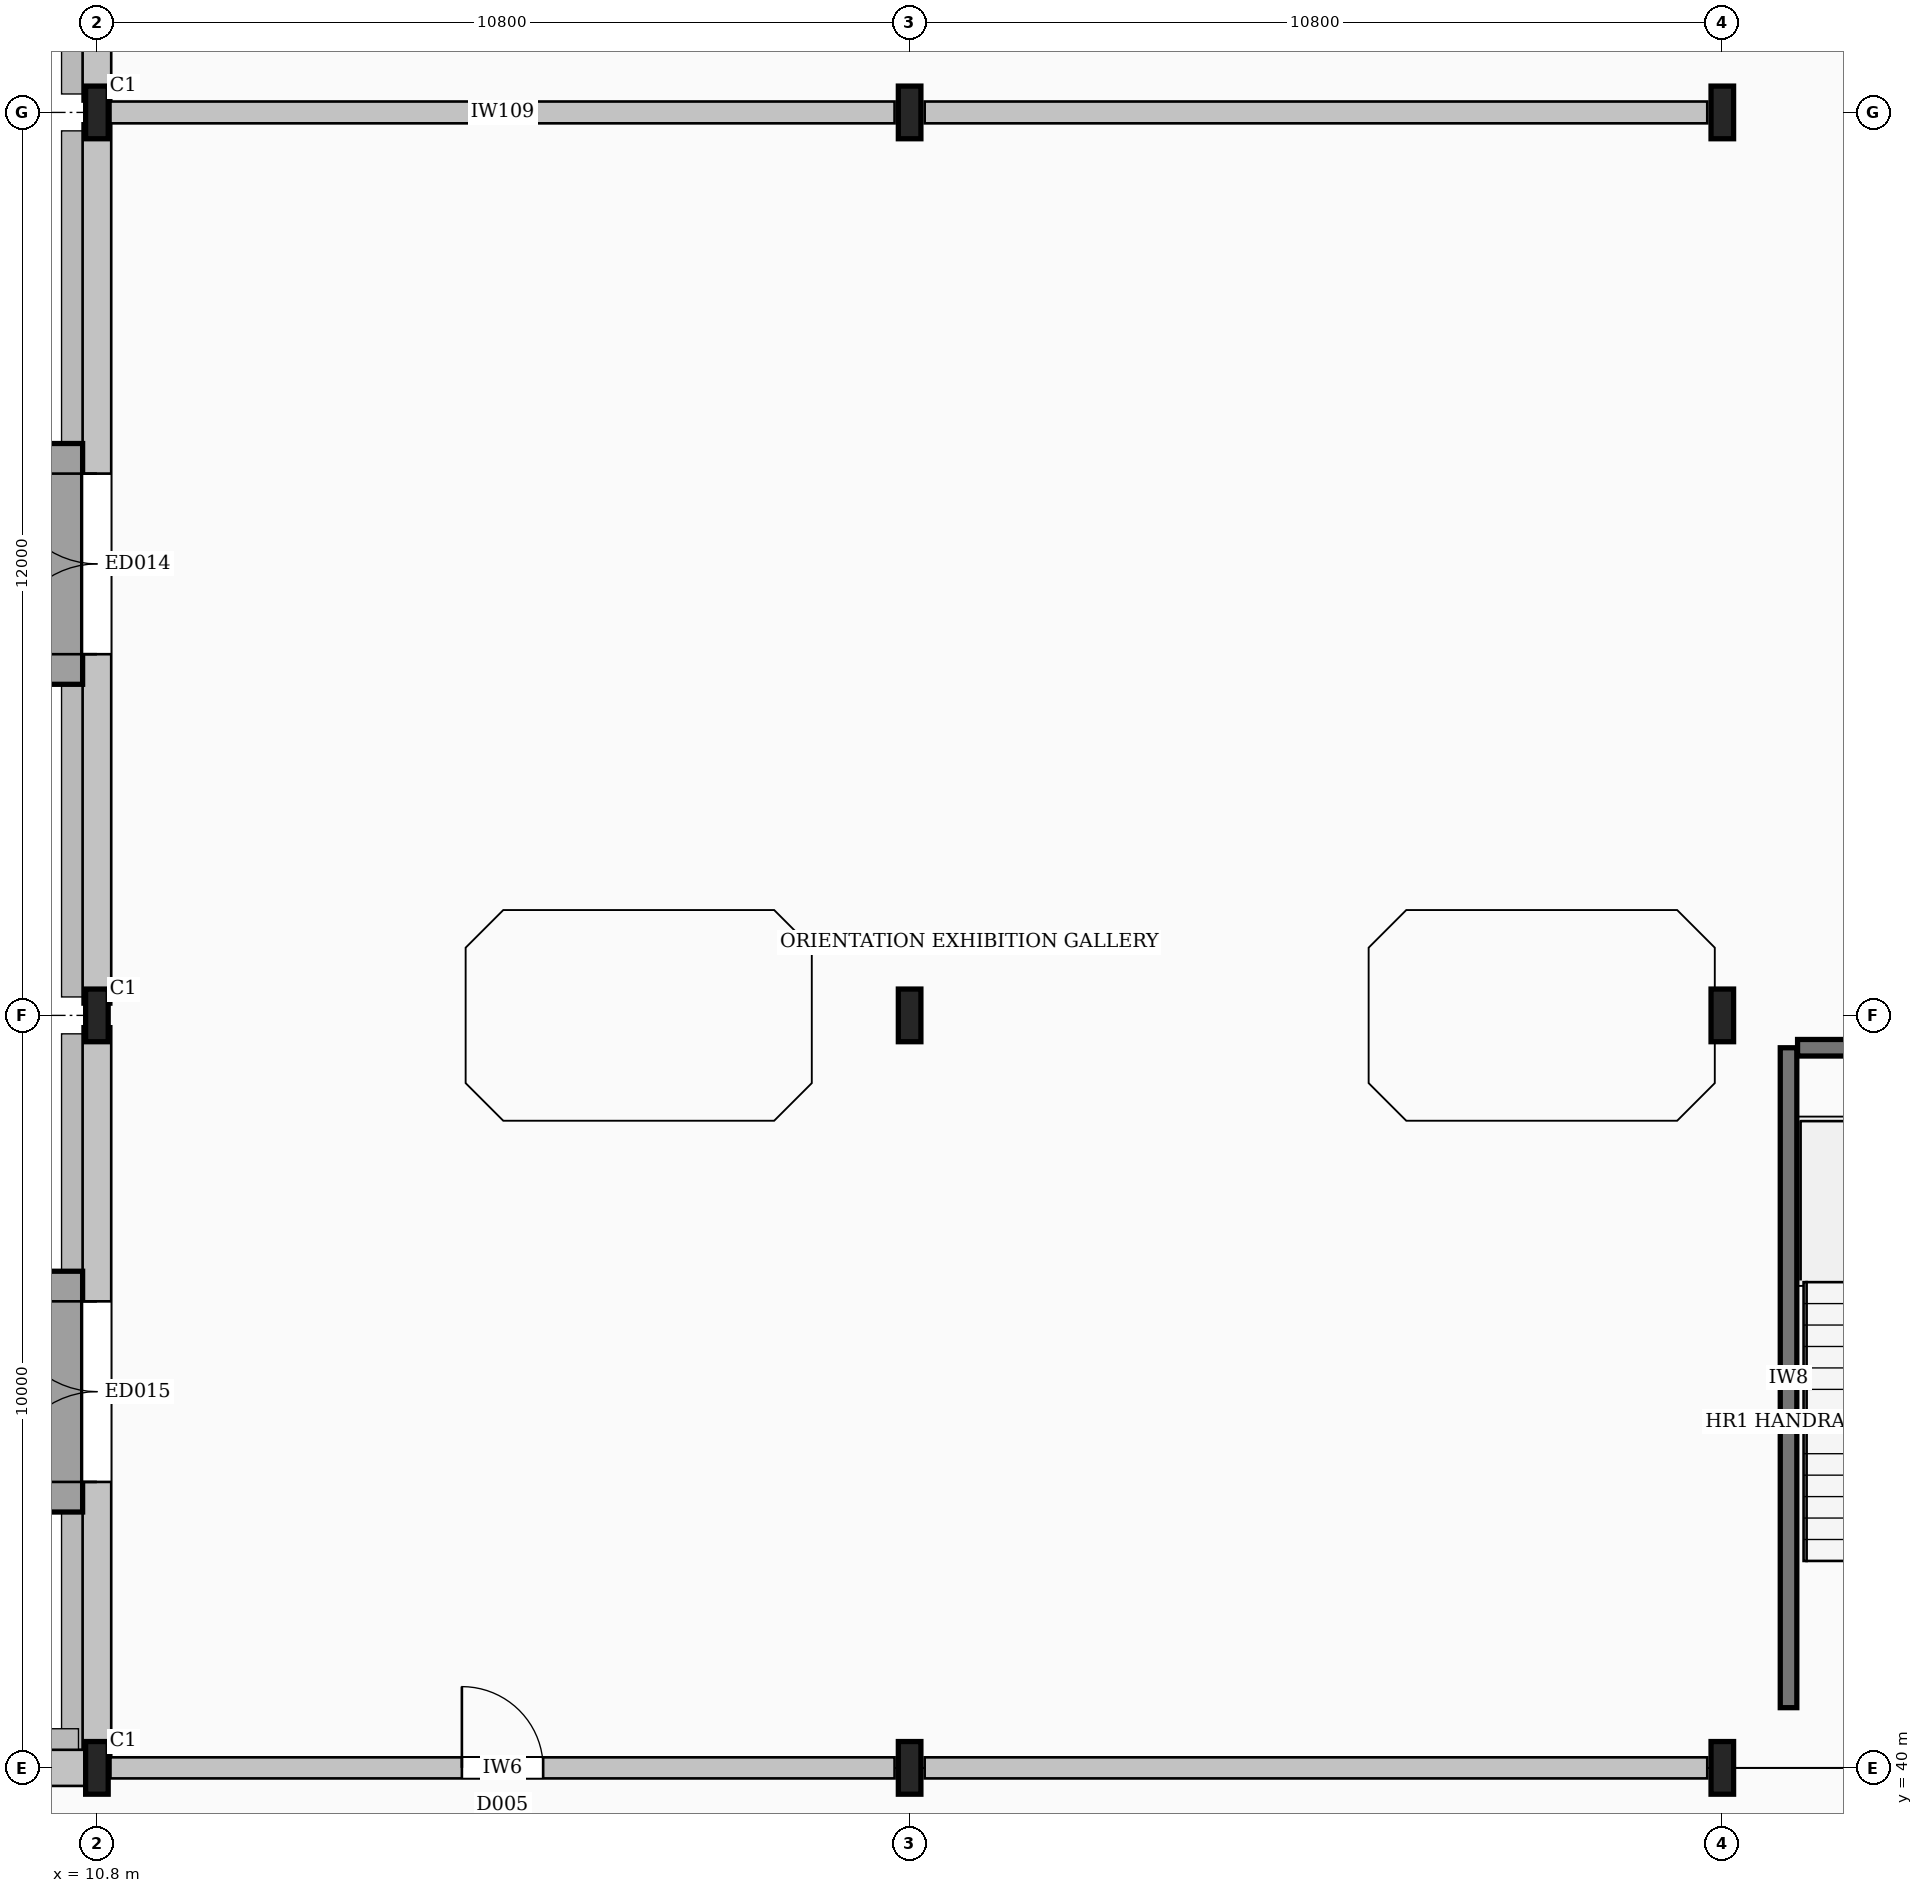
"""IFC4 building model, lengths in metres.
Left out: names, types, materials, properties, quantities, classifications, styles, units other than length and angle.
Written with IfcOpenShell. Run it as: python <this file> out.ifc"""

import sys

from ifc_helpers import new_model, si_unit, direction, frame, frame_2d, origin, origin_2d, place, context, subcontext, project, spatial, rectangle, i_section, extrude, element, fill, save


model = new_model("IFC4")
c1 = context("Model", 3, precision=1e-05, world=origin(), true_north=direction((0.0, 1.0)))
c2 = subcontext(c1, "Body", "Model", "MODEL_VIEW")
j1 = project(units=[si_unit("LENGTHUNIT", "METRE"), si_unit("PLANEANGLEUNIT", "RADIAN")], contexts=[c1])
p1 = place(None, origin())
s1 = spatial("IfcSite", under=j1, at=p1, CompositionType="ELEMENT")
p2 = place(p1, origin())
s2 = spatial("IfcBuilding", under=s1, at=p2, CompositionType="ELEMENT")
p3 = place(p2, origin())
s3 = spatial("IfcBuildingStorey", under=s2, at=p3, CompositionType="ELEMENT", Elevation=0.0)
for number, where, z_axis, x_axis in (
    (1, (10.8, 40.0, 0.0), (0.0, 0.0, 1.0), (1.0, 0.0, 0.0)),
    (2, (10.8, 50.0, 0.0), (0.0, 0.0, 1.0), (1.0, 0.0, 0.0)),
    (3, (10.8, 62.0, 0.0), (0.0, 0.0, 1.0), (1.0, 0.0, 0.0)),
    (4, (21.6, 40.0, 0.0), (0.0, 0.0, 1.0), (1.0, 0.0, 0.0)),
    (5, (21.6, 50.0, 0.0), (0.0, 0.0, 1.0), (1.0, 0.0, 0.0)),
    (6, (21.6, 62.0, 0.0), (0.0, 0.0, 1.0), (1.0, 0.0, 0.0)),
    (7, (32.4, 40.0, 0.0), (0.0, 0.0, 1.0), (1.0, 0.0, 0.0)),
    (8, (32.4, 50.0, 0.0), (0.0, 0.0, 1.0), (1.0, 0.0, 0.0)),
    (9, (32.4, 62.0, 0.0), (0.0, 0.0, 1.0), (1.0, 0.0, 0.0)),
):
    element("IfcColumn", number, at=place(p3, frame(where, z_axis=z_axis, x_axis=x_axis)), inside=s3, PredefinedType="COLUMN", context=c2, shape_type="SweptSolid", body=[
        extrude(i_section(OverallWidth=0.3, OverallDepth=0.7, WebThickness=0.017, FlangeThickness=0.032, FilletRadius=0.027, at=origin_2d()), origin(), (0.0, 0.0, 1.0), 4.8),
    ])
p4 = place(p3, frame((10.8, 71.855, 0.0), z_axis=(0.0, 0.0, 1.0), x_axis=(0.0, -1.0, 0.0)))
e10 = element("IfcWall", 10, at=p4, inside=s3, PredefinedType="STANDARD", context=c2, shape_type="SweptSolid", body=[
    extrude(rectangle(XDim=9.71, YDim=0.38, at=frame_2d((4.855, 0.0))), origin(), (0.0, 0.0, 1.0), 4.04),
])
p5 = place(p4, frame((3.655, 0.0, 0.0)))
e11 = element("IfcOpeningElement", 11, at=p5, cuts=e10, PredefinedType="OPENING", context=c2, shape_type="SweptSolid", body=[
    extrude(rectangle(XDim=2.4, YDim=2.6, at=frame_2d((1.2, 1.3))), frame((0.0, 0.2, 0.0), z_axis=(0.0, -1.0, 0.0), x_axis=(1.0, 0.0, 0.0)), (0.0, 0.0, 1.0), 0.4),
])
p6 = place(p3, frame((10.8, 61.855, 0.0), z_axis=(0.0, 0.0, 1.0), x_axis=(0.0, -1.0, 0.0)))
e12 = element("IfcWall", 12, at=p6, inside=s3, PredefinedType="STANDARD", context=c2, shape_type="SweptSolid", body=[
    extrude(rectangle(XDim=11.71, YDim=0.38, at=frame_2d((5.855, 0.0))), origin(), (0.0, 0.0, 1.0), 3.939),
])
p7 = place(p6, frame((4.655, 0.0, 0.0)))
e13 = element("IfcOpeningElement", 13, at=p7, cuts=e12, PredefinedType="OPENING", context=c2, shape_type="SweptSolid", body=[
    extrude(rectangle(XDim=2.4, YDim=2.6, at=frame_2d((1.2, 1.3))), frame((0.0, 0.2, 0.0), z_axis=(0.0, -1.0, 0.0), x_axis=(1.0, 0.0, 0.0)), (0.0, 0.0, 1.0), 0.4),
])
p8 = place(p3, frame((10.8, 49.855, 0.0), z_axis=(0.0, 0.0, 1.0), x_axis=(0.0, -1.0, 0.0)))
e14 = element("IfcWall", 14, at=p8, inside=s3, PredefinedType="STANDARD", context=c2, shape_type="SweptSolid", body=[
    extrude(rectangle(XDim=9.71, YDim=0.38, at=frame_2d((4.855, 0.0))), origin(), (0.0, 0.0, 1.0), 4.04),
])
p9 = place(p8, frame((3.655, 0.0, 0.0)))
e15 = element("IfcOpeningElement", 15, at=p9, cuts=e14, PredefinedType="OPENING", context=c2, shape_type="SweptSolid", body=[
    extrude(rectangle(XDim=2.4, YDim=2.6, at=frame_2d((1.2, 1.3))), frame((0.0, 0.2, 0.0), z_axis=(0.0, -1.0, 0.0), x_axis=(1.0, 0.0, 0.0)), (0.0, 0.0, 1.0), 0.4),
])
p10 = place(p3, frame((10.655, 40.0, 0.0), z_axis=(0.0, 0.0, 1.0), x_axis=(-1.0, 0.0, 0.0)))
e16 = element("IfcWall", 16, at=p10, inside=s3, PredefinedType="STANDARD", context=c2, shape_type="SweptSolid", body=[
    extrude(rectangle(XDim=10.51, YDim=0.48, at=frame_2d((5.255, 0.0))), origin(), (0.0, 0.0, 1.0), 4.009),
])
p11 = place(p10, frame((3.455, 0.0, 0.9)))
e17 = element("IfcOpeningElement", 17, at=p11, cuts=e16, PredefinedType="OPENING", context=c2, shape_type="SweptSolid", body=[
    extrude(rectangle(XDim=3.6, YDim=2.8, at=frame_2d((1.8, 1.4))), frame((0.0, 0.25, 0.0), z_axis=(0.0, -1.0, 0.0), x_axis=(1.0, 0.0, 0.0)), (0.0, 0.0, 1.0), 0.5),
])
p12 = place(p3, frame((33.28, 40.8, 0.0), z_axis=(0.0, 0.0, 1.0), x_axis=(0.0, 1.0, 0.0)))
e18 = element("IfcWall", 18, at=p12, inside=s3, PredefinedType="SHEAR", context=c2, shape_type="SweptSolid", body=[
    extrude(rectangle(XDim=8.77, YDim=0.22, at=frame_2d((4.385, 0.0))), origin(), (0.0, 0.0, 1.0), 4.56),
])
p13 = place(p3, frame((33.4, 49.57, 0.0), z_axis=(0.0, 0.0, 1.0), x_axis=(1.0, 0.0, 0.0)))
e19 = element("IfcWall", 19, at=p13, inside=s3, PredefinedType="SHEAR", context=c2, shape_type="SweptSolid", body=[
    extrude(rectangle(XDim=4.4, YDim=0.22, at=frame_2d((2.2, 0.0))), origin(), (0.0, 0.0, 1.0), 4.56),
])
p14 = place(p3, frame((10.98, 40.0, 0.0), z_axis=(0.0, 0.0, 1.0), x_axis=(1.0, 0.0, 0.0)))
e20 = element("IfcWall", 20, at=p14, inside=s3, PredefinedType="SOLIDWALL", context=c2, shape_type="SweptSolid", body=[
    extrude(rectangle(XDim=10.42, YDim=0.28, at=frame_2d((5.21, 0.0))), origin(), (0.0, 0.0, 1.0), 3.989),
])
p15 = place(p14, frame((4.67, 0.0, 0.0)))
e21 = element("IfcOpeningElement", 21, at=p15, cuts=e20, PredefinedType="OPENING", context=c2, shape_type="SweptSolid", body=[
    extrude(rectangle(XDim=1.08, YDim=2.25, at=frame_2d((0.54, 1.125))), frame((0.0, 0.15, 0.0), z_axis=(0.0, -1.0, 0.0), x_axis=(1.0, 0.0, 0.0)), (0.0, 0.0, 1.0), 0.3),
])
p16 = place(p3, frame((21.8, 40.0, 0.0), z_axis=(0.0, 0.0, 1.0), x_axis=(1.0, 0.0, 0.0)))
e22 = element("IfcWall", 22, at=p16, inside=s3, PredefinedType="SOLIDWALL", context=c2, shape_type="SweptSolid", body=[
    extrude(rectangle(XDim=10.4, YDim=0.28, at=frame_2d((5.2, 0.0))), origin(), (0.0, 0.0, 1.0), 3.989),
])
p17 = place(p3, frame((10.98, 62.0, 0.0), z_axis=(0.0, 0.0, 1.0), x_axis=(1.0, 0.0, 0.0)))
e23 = element("IfcWall", 23, at=p17, inside=s3, PredefinedType="PARTITIONING", context=c2, shape_type="SweptSolid", body=[
    extrude(rectangle(XDim=10.42, YDim=0.29, at=frame_2d((5.21, 0.0))), origin(), (0.0, 0.0, 1.0), 4.049),
])
p18 = place(p3, frame((21.8, 62.0, 0.0), z_axis=(0.0, 0.0, 1.0), x_axis=(1.0, 0.0, 0.0)))
e24 = element("IfcWall", 24, at=p18, inside=s3, PredefinedType="PARTITIONING", context=c2, shape_type="SweptSolid", body=[
    extrude(rectangle(XDim=10.4, YDim=0.29, at=frame_2d((5.2, 0.0))), origin(), (0.0, 0.0, 1.0), 4.049),
])
p19 = place(p7, frame((2.4, 0.0, 0.0), z_axis=(0.0, 0.0, 1.0), x_axis=(-1.0, 0.0, 0.0)))
e25 = element("IfcDoor", 25, at=p19, inside=s3, OperationType="DOUBLE_DOOR_SINGLE_SWING", PredefinedType="DOOR", context=c2, shape_type="SweptSolid", body=[
    extrude(rectangle(XDim=2.4, YDim=2.6, at=frame_2d((1.2, 1.3))), frame((0.0, 0.025, 0.0), z_axis=(0.0, -1.0, 0.0), x_axis=(1.0, 0.0, 0.0)), (0.0, 0.0, 1.0), 0.05),
])
fill(e13, e25)
p20 = place(p9, frame((2.4, 0.0, 0.0), z_axis=(0.0, 0.0, 1.0), x_axis=(-1.0, 0.0, 0.0)))
e26 = element("IfcDoor", 26, at=p20, inside=s3, OperationType="DOUBLE_DOOR_SINGLE_SWING", PredefinedType="DOOR", context=c2, shape_type="SweptSolid", body=[
    extrude(rectangle(XDim=2.4, YDim=2.6, at=frame_2d((1.2, 1.3))), frame((0.0, 0.025, 0.0), z_axis=(0.0, -1.0, 0.0), x_axis=(1.0, 0.0, 0.0)), (0.0, 0.0, 1.0), 0.05),
])
fill(e15, e26)
p21 = place(p15, origin())
e27 = element("IfcDoor", 27, at=p21, inside=s3, OperationType="SINGLE_SWING_LEFT", PredefinedType="DOOR", context=c2, shape_type="SweptSolid", body=[
    extrude(rectangle(XDim=1.08, YDim=2.25, at=frame_2d((0.54, 1.125))), frame((0.0, 0.025, 0.0), z_axis=(0.0, -1.0, 0.0), x_axis=(1.0, 0.0, 0.0)), (0.0, 0.0, 1.0), 0.05),
])
fill(e21, e27)
save(model, sys.argv[1])
